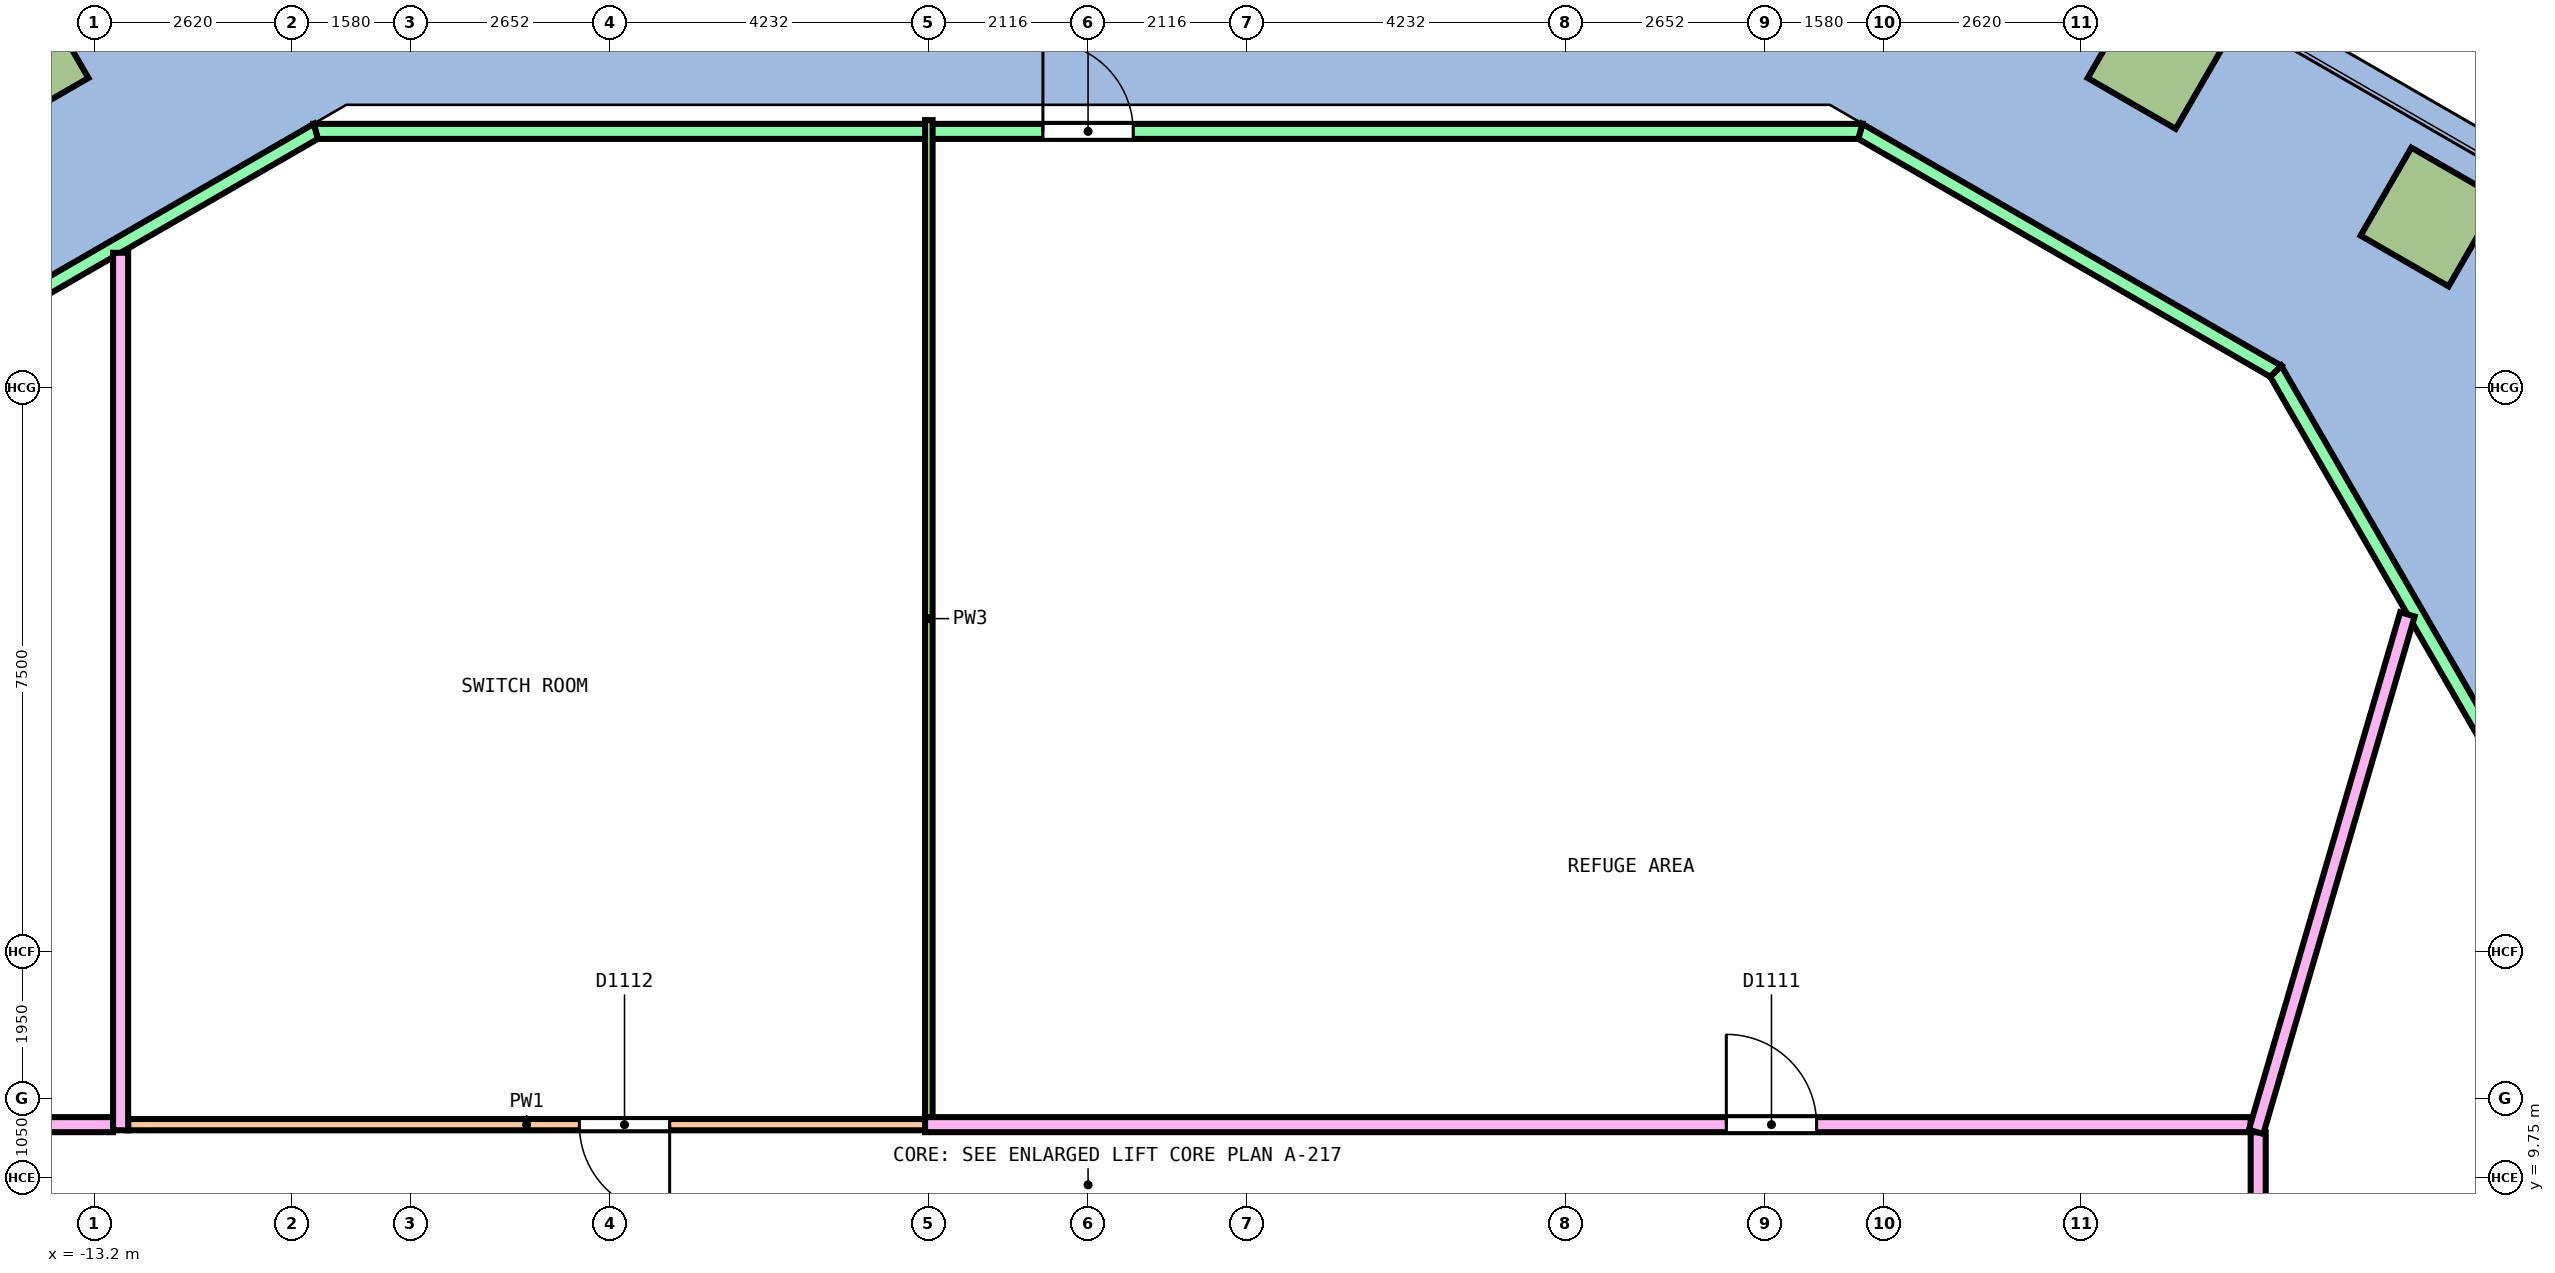
"""IFC4 building model, lengths in metres.
Left out: names, types, materials, properties, quantities, classifications, styles, units other than length and angle.
Written with IfcOpenShell. Run it as: python <this file> out.ifc"""

import sys

from ifc_helpers import new_model, si_unit, direction, frame, frame_2d, origin, origin_2d, place, context, subcontext, project, spatial, polyline, rectangle, outline, extrude, element, fill, save


model = new_model("IFC4")
c1 = context("Model", 3, precision=1e-05, world=origin(), true_north=direction((0.0, 1.0)))
c2 = subcontext(c1, "Body", "Model", "MODEL_VIEW")
j1 = project(units=[si_unit("LENGTHUNIT", "METRE"), si_unit("PLANEANGLEUNIT", "RADIAN")], contexts=[c1])
p1 = place(None, origin())
s1 = spatial("IfcSite", under=j1, at=p1, CompositionType="ELEMENT")
p2 = place(p1, origin())
s2 = spatial("IfcBuilding", under=s1, at=p2, CompositionType="ELEMENT")
p3 = place(p2, frame((0.0, 0.0, 139.6)))
s3 = spatial("IfcBuildingStorey", under=s2, at=p3, CompositionType="ELEMENT", Elevation=139.6)
for number, where, z_axis, x_axis in (
    (1, (17.833, 22.512, 0.0), (0.0, 0.0, 1.0), (-0.866, 0.5, 0.0)),
    (2, (14.206, 24.606, 0.0), (0.0, 0.0, 1.0), (-0.866, 0.5, 0.0)),
    (3, (-14.206, 24.606, 0.0), (0.0, 0.0, 1.0), (-0.866, -0.5, 0.0)),
):
    element("IfcColumn", number, at=place(p3, frame(where, z_axis=z_axis, x_axis=x_axis)), inside=s3, PredefinedType="COLUMN", context=c2, shape_type="SweptSolid", body=[
        extrude(rectangle(XDim=1.35, YDim=1.35, at=origin_2d()), origin(), (0.0, 0.0, 1.0), 5.25),
    ])
p4 = place(p3, frame((25.613, 3.437, 0.0), z_axis=(0.0, 0.0, 1.0), x_axis=(-0.499999083763, 0.866025932773, 0.0)))
e4 = element("IfcWall", 4, at=p4, inside=s3, PredefinedType="SOLIDWALL", context=c2, shape_type="SweptSolid", body=[
    extrude(outline(polyline([(-0.027, -0.1), (19.686, -0.1), (19.632, 0.1), (0.027, 0.1), (-0.027, -0.1)])), origin(), (0.0, 0.0, 1.0), 4.55),
])
p5 = place(p3, frame((15.783, 20.463, 0.0), z_axis=(0.0, 0.0, 1.0), x_axis=(-0.866026138243, 0.499998727878, 0.0)))
e5 = element("IfcWall", 5, at=p5, inside=s3, PredefinedType="SOLIDWALL", context=c2, shape_type="SweptSolid", body=[
    extrude(outline(polyline([(-0.027, -0.1), (6.401, -0.1), (6.348, 0.1), (0.027, 0.1), (-0.027, -0.1)])), origin(), (0.0, 0.0, 1.0), 4.55),
])
p6 = place(p3, frame((10.263, 23.65, 0.0), z_axis=(0.0, 0.0, 1.0), x_axis=(-1.0, 0.0, 0.0)))
e6 = element("IfcWall", 6, at=p6, inside=s3, PredefinedType="SOLIDWALL", context=c2, shape_type="SweptSolid", body=[
    extrude(outline(polyline([(-0.027, -0.1), (20.552, -0.1), (20.499, 0.1), (0.027, 0.1), (-0.027, -0.1)])), origin(), (0.0, 0.0, 1.0), 4.55),
])
p7 = place(p6, frame((9.663, 0.0, 0.0)))
e7 = element("IfcOpeningElement", 7, at=p7, cuts=e6, PredefinedType="OPENING", context=c2, shape_type="SweptSolid", body=[
    extrude(rectangle(XDim=1.2, YDim=2.1, at=frame_2d((0.6, 1.05))), frame((0.0, 0.11, 0.0), z_axis=(0.0, -1.0, 0.0), x_axis=(1.0, 0.0, 0.0)), (0.0, 0.0, 1.0), 0.22),
])
p8 = place(p3, frame((-10.263, 23.65, 0.0), z_axis=(0.0, 0.0, 1.0), x_axis=(-0.866026138243, -0.499998727878, 0.0)))
e8 = element("IfcWall", 8, at=p8, inside=s3, PredefinedType="SOLIDWALL", context=c2, shape_type="SweptSolid", body=[
    extrude(outline(polyline([(-0.027, -0.1), (6.401, -0.1), (6.348, 0.1), (0.027, 0.1), (-0.027, -0.1)])), origin(), (0.0, 0.0, 1.0), 4.55),
])
p9 = place(p3, frame((-12.756, 10.45, 0.0), z_axis=(0.0, 0.0, 1.0), x_axis=(1.0, 0.0, 0.0)))
e9 = element("IfcWall", 9, at=p9, inside=s3, PredefinedType="PARTITIONING", context=c2, shape_type="SweptSolid", body=[
    extrude(rectangle(XDim=10.59, YDim=0.15, at=frame_2d((5.295, 0.0))), origin(), (0.0, 0.0, 1.0), 4.25),
])
p10 = place(p9, frame((5.996, 0.0, 0.0)))
e10 = element("IfcOpeningElement", 10, at=p10, cuts=e9, PredefinedType="OPENING", context=c2, shape_type="SweptSolid", body=[
    extrude(rectangle(XDim=1.2, YDim=2.1, at=frame_2d((0.6, 1.05))), frame((0.0, 0.085, 0.0), z_axis=(0.0, -1.0, 0.0), x_axis=(1.0, 0.0, 0.0)), (0.0, 0.0, 1.0), 0.17),
])
p11 = place(p3, frame((-2.116, 10.55, 0.0), z_axis=(0.0, 0.0, 1.0), x_axis=(0.0, 1.0, 0.0)))
e11 = element("IfcWall", 11, at=p11, inside=s3, PredefinedType="PARTITIONING", context=c2, shape_type="SweptSolid", body=[
    extrude(rectangle(XDim=13.25, YDim=0.1, at=frame_2d((6.625, 0.0))), origin(), (0.0, 0.0, 1.0), 4.25),
])
p12 = place(p3, frame((15.55, 3.564, 0.0), z_axis=(0.0, 0.0, 1.0), x_axis=(0.0, 1.0, 0.0)))
e12 = element("IfcWall", 12, at=p12, inside=s3, PredefinedType="PARTITIONING", context=c2, shape_type="SweptSolid", body=[
    extrude(rectangle(XDim=6.786, YDim=0.2, at=frame_2d((3.393, 0.0))), origin(), (0.0, 0.0, 1.0), 4.25),
])
p13 = place(p12, frame((2.03, 0.0, 0.0)))
e13 = element("IfcOpeningElement", 13, at=p13, cuts=e12, PredefinedType="OPENING", context=c2, shape_type="SweptSolid", body=[
    extrude(rectangle(XDim=1.2, YDim=2.1, at=frame_2d((0.6, 1.05))), frame((0.0, 0.11, 0.0), z_axis=(0.0, -1.0, 0.0), x_axis=(1.0, 0.0, 0.0)), (0.0, 0.0, 1.0), 0.22),
])
p14 = place(p3, frame((-15.45, 10.45, 0.0), z_axis=(0.0, 0.0, 1.0), x_axis=(1.0, 0.0, 0.0)))
e14 = element("IfcWall", 14, at=p14, inside=s3, PredefinedType="PARTITIONING", context=c2, shape_type="SweptSolid", body=[
    extrude(rectangle(XDim=2.494, YDim=0.2, at=frame_2d((1.247, 0.0))), origin(), (0.0, 0.0, 1.0), 4.25),
])
p15 = place(p3, frame((-2.166, 10.45, 0.0), z_axis=(0.0, 0.0, 1.0), x_axis=(1.0, 0.0, 0.0)))
e15 = element("IfcWall", 15, at=p15, inside=s3, PredefinedType="PARTITIONING", context=c2, shape_type="SweptSolid", body=[
    extrude(rectangle(XDim=17.616, YDim=0.2, at=frame_2d((8.808, 0.0))), origin(), (0.0, 0.0, 1.0), 4.25),
])
p16 = place(p15, frame((10.648, 0.0, 0.0)))
e16 = element("IfcOpeningElement", 16, at=p16, cuts=e15, PredefinedType="OPENING", context=c2, shape_type="SweptSolid", body=[
    extrude(rectangle(XDim=1.2, YDim=2.1, at=frame_2d((0.6, 1.05))), frame((0.0, 0.11, 0.0), z_axis=(0.0, -1.0, 0.0), x_axis=(1.0, 0.0, 0.0)), (0.0, 0.0, 1.0), 0.22),
])
p17 = place(p3, frame((15.522, 10.354, 0.0), z_axis=(0.0, 0.0, 1.0), x_axis=(0.280633147228, 0.959815105464, 0.0)))
e17 = element("IfcWall", 17, at=p17, inside=s3, PredefinedType="PARTITIONING", context=c2, shape_type="SweptSolid", body=[
    extrude(rectangle(XDim=7.166, YDim=0.2, at=frame_2d((3.583, 0.0))), origin(), (0.0, 0.0, 1.0), 4.25),
])
p18 = place(p3, frame((-12.856, 10.375, 0.0), z_axis=(0.0, 0.0, 1.0), x_axis=(0.0, 1.0, 0.0)))
e18 = element("IfcWall", 18, at=p18, inside=s3, PredefinedType="PARTITIONING", context=c2, shape_type="SweptSolid", body=[
    extrude(rectangle(XDim=11.662, YDim=0.2, at=frame_2d((5.831, 0.0))), origin(), (0.0, 0.0, 1.0), 4.25),
])
p19 = place(p7, origin())
e19 = element("IfcDoor", 19, at=p19, inside=s3, OperationType="SINGLE_SWING_RIGHT", PredefinedType="DOOR", context=c2, shape_type="SweptSolid", body=[
    extrude(rectangle(XDim=1.2, YDim=2.1, at=frame_2d((0.6, 1.05))), frame((0.0, 0.025, 0.0), z_axis=(0.0, -1.0, 0.0), x_axis=(1.0, 0.0, 0.0)), (0.0, 0.0, 1.0), 0.05),
])
fill(e7, e19)
p20 = place(p16, origin())
e20 = element("IfcDoor", 20, at=p20, inside=s3, OperationType="DOUBLE_DOOR_SINGLE_SWING", PredefinedType="DOOR", context=c2, shape_type="SweptSolid", body=[
    extrude(rectangle(XDim=1.2, YDim=2.1, at=frame_2d((0.6, 1.05))), frame((0.0, 0.025, 0.0), z_axis=(0.0, -1.0, 0.0), x_axis=(1.0, 0.0, 0.0)), (0.0, 0.0, 1.0), 0.05),
])
fill(e16, e20)
p21 = place(p10, origin())
e21 = element("IfcDoor", 21, at=p21, inside=s3, OperationType="DOUBLE_DOOR_SINGLE_SWING", PredefinedType="DOOR", context=c2, shape_type="SweptSolid", body=[
    extrude(rectangle(XDim=1.2, YDim=2.1, at=frame_2d((0.6, 1.05))), frame((0.0, 0.025, 0.0), z_axis=(0.0, -1.0, 0.0), x_axis=(1.0, 0.0, 0.0)), (0.0, 0.0, 1.0), 0.05),
])
fill(e10, e21)
save(model, sys.argv[1])
